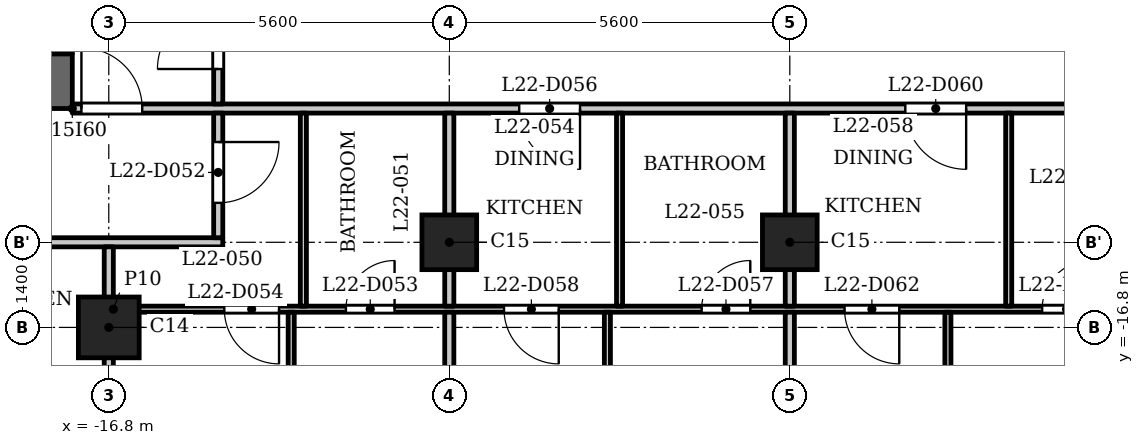
"""IFC4 building model, lengths in metres.
Left out: names, types, materials, properties, quantities, classifications, styles, units other than length and angle.
Written with IfcOpenShell. Run it as: python <this file> out.ifc"""

import sys

from ifc_helpers import new_model, si_unit, direction, frame, frame_2d, origin, origin_2d, place, context, subcontext, project, spatial, rectangle, extrude, element, fill, save


model = new_model("IFC4")
c1 = context("Model", 3, precision=1e-05, world=origin(), true_north=direction((0.0, 1.0)))
c2 = subcontext(c1, "Body", "Model", "MODEL_VIEW")
j1 = project(units=[si_unit("LENGTHUNIT", "METRE"), si_unit("PLANEANGLEUNIT", "RADIAN")], contexts=[c1])
p1 = place(None, origin())
s1 = spatial("IfcSite", under=j1, at=p1, CompositionType="ELEMENT")
p2 = place(p1, origin())
s2 = spatial("IfcBuilding", under=s1, at=p2, CompositionType="ELEMENT")
p3 = place(p2, frame((0.0, 0.0, 90.3)))
s3 = spatial("IfcBuildingStorey", under=s2, at=p3, CompositionType="ELEMENT", Elevation=90.3)
p4 = place(p3, frame((-16.8, -16.8, 0.0), z_axis=(0.0, 0.0, 1.0), x_axis=(1.0, 0.0, 0.0)))
e1 = element("IfcColumn", 1, at=p4, inside=s3, PredefinedType="COLUMN", context=c2, shape_type="SweptSolid", body=[
    extrude(rectangle(XDim=1.0, YDim=1.0, at=origin_2d()), origin(), (0.0, 0.0, 1.0), 3.5),
])
for number, where, z_axis, x_axis in (
    (2, (-11.2, -15.4, 0.0), (0.0, 0.0, 1.0), (1.0, 0.0, 0.0)),
    (3, (-5.6, -15.4, 0.0), (0.0, 0.0, 1.0), (1.0, 0.0, 0.0)),
):
    element("IfcColumn", number, at=place(p3, frame(where, z_axis=z_axis, x_axis=x_axis)), inside=s3, PredefinedType="COLUMN", context=c2, shape_type="SweptSolid", body=[
        extrude(rectangle(XDim=0.9, YDim=0.9, at=origin_2d()), origin(), (0.0, 0.0, 1.0), 3.5),
    ])
p5 = place(p3, frame((-17.4, -12.75, 0.0), z_axis=(0.0, 0.0, 1.0), x_axis=(-1.0, 0.0, 0.0)))
e4 = element("IfcWall", 4, at=p5, inside=s3, PredefinedType="SHEAR", context=c2, shape_type="SweptSolid", body=[
    extrude(rectangle(XDim=10.4, YDim=0.9, at=frame_2d((5.2, 0.0))), origin(), (0.0, 0.0, 1.0), 3.2),
])
p6 = place(p3, frame((-17.6, -12.3, 0.0), z_axis=(0.0, 0.0, 1.0), x_axis=(0.0, 1.0, 0.0)))
e5 = element("IfcWall", 5, at=p6, inside=s3, PredefinedType="SHEAR", context=c2, shape_type="SweptSolid", body=[
    extrude(rectangle(XDim=24.6, YDim=0.4, at=frame_2d((12.3, 0.0))), origin(), (0.0, 0.0, 1.0), 3.2),
])
p7 = place(p6, frame((6.0, 0.0, 0.0)))
e6 = element("IfcOpeningElement", 6, at=p7, cuts=e5, PredefinedType="OPENING", context=c2, shape_type="SweptSolid", body=[
    extrude(rectangle(XDim=1.1, YDim=2.1, at=frame_2d((0.55, 1.05))), frame((0.0, 0.21, 0.0), z_axis=(0.0, -1.0, 0.0), x_axis=(1.0, 0.0, 0.0)), (0.0, 0.0, 1.0), 0.42),
])
p8 = place(p6, frame((8.4, 0.0, 0.0)))
e7 = element("IfcOpeningElement", 7, at=p8, cuts=e5, PredefinedType="OPENING", context=c2, shape_type="SweptSolid", body=[
    extrude(rectangle(XDim=1.1, YDim=2.1, at=frame_2d((0.55, 1.05))), frame((0.0, 0.21, 0.0), z_axis=(0.0, -1.0, 0.0), x_axis=(1.0, 0.0, 0.0)), (0.0, 0.0, 1.0), 0.42),
])
p9 = place(p6, frame((10.8, 0.0, 0.0)))
e8 = element("IfcOpeningElement", 8, at=p9, cuts=e5, PredefinedType="OPENING", context=c2, shape_type="SweptSolid", body=[
    extrude(rectangle(XDim=1.1, YDim=2.1, at=frame_2d((0.55, 1.05))), frame((0.0, 0.21, 0.0), z_axis=(0.0, -1.0, 0.0), x_axis=(1.0, 0.0, 0.0)), (0.0, 0.0, 1.0), 0.42),
])
p10 = place(p6, frame((16.75, 0.0, 0.0)))
e9 = element("IfcOpeningElement", 9, at=p10, cuts=e5, PredefinedType="OPENING", context=c2, shape_type="SweptSolid", body=[
    extrude(rectangle(XDim=0.9, YDim=2.1, at=frame_2d((0.45, 1.05))), frame((0.0, 0.21, 0.0), z_axis=(0.0, -1.0, 0.0), x_axis=(1.0, 0.0, 0.0)), (0.0, 0.0, 1.0), 0.42),
])
p11 = place(p6, frame((22.8, 0.0, 0.0)))
e10 = element("IfcOpeningElement", 10, at=p11, cuts=e5, PredefinedType="OPENING", context=c2, shape_type="SweptSolid", body=[
    extrude(rectangle(XDim=1.1, YDim=2.1, at=frame_2d((0.55, 1.05))), frame((0.0, 0.21, 0.0), z_axis=(0.0, -1.0, 0.0), x_axis=(1.0, 0.0, 0.0)), (0.0, 0.0, 1.0), 0.42),
])
p12 = place(p6, frame((0.7, 0.0, 0.0)))
e11 = element("IfcOpeningElement", 11, at=p12, cuts=e5, PredefinedType="OPENING", context=c2, shape_type="SweptSolid", body=[
    extrude(rectangle(XDim=1.1, YDim=2.1, at=frame_2d((0.55, 1.05))), frame((0.0, 0.21, 0.0), z_axis=(0.0, -1.0, 0.0), x_axis=(1.0, 0.0, 0.0)), (0.0, 0.0, 1.0), 0.42),
])
p13 = place(p6, frame((12.775, 0.0, 0.0)))
e12 = element("IfcOpeningElement", 12, at=p13, cuts=e5, PredefinedType="OPENING", context=c2, shape_type="SweptSolid", body=[
    extrude(rectangle(XDim=1.8, YDim=2.1, at=frame_2d((0.9, 1.05))), frame((0.0, 0.21, 0.0), z_axis=(0.0, -1.0, 0.0), x_axis=(1.0, 0.0, 0.0)), (0.0, 0.0, 1.0), 0.42),
])
p14 = place(p3, frame((-16.725, -16.5, 0.0), z_axis=(0.0, 0.0, 1.0), x_axis=(1.0, 0.0, 0.0)))
e13 = element("IfcWall", 13, at=p14, inside=s3, PredefinedType="PARTITIONING", context=c2, shape_type="SweptSolid", body=[
    extrude(rectangle(XDim=33.45, YDim=0.1, at=frame_2d((16.725, 0.0))), origin(), (0.0, 0.0, 1.0), 3.2),
])
p15 = place(p14, frame((3.825, 0.0, 0.0)))
e14 = element("IfcOpeningElement", 14, at=p15, cuts=e13, PredefinedType="OPENING", context=c2, shape_type="SweptSolid", body=[
    extrude(rectangle(XDim=0.8, YDim=2.1, at=frame_2d((0.4, 1.05))), frame((0.0, 0.06, 0.0), z_axis=(0.0, -1.0, 0.0), x_axis=(1.0, 0.0, 0.0)), (0.0, 0.0, 1.0), 0.12),
])
p16 = place(p14, frame((1.825, 0.0, 0.0)))
e15 = element("IfcOpeningElement", 15, at=p16, cuts=e13, PredefinedType="OPENING", context=c2, shape_type="SweptSolid", body=[
    extrude(rectangle(XDim=0.9, YDim=2.1, at=frame_2d((0.45, 1.05))), frame((0.0, 0.06, 0.0), z_axis=(0.0, -1.0, 0.0), x_axis=(1.0, 0.0, 0.0)), (0.0, 0.0, 1.0), 0.12),
])
p17 = place(p14, frame((9.675, 0.0, 0.0)))
e16 = element("IfcOpeningElement", 16, at=p17, cuts=e13, PredefinedType="OPENING", context=c2, shape_type="SweptSolid", body=[
    extrude(rectangle(XDim=0.8, YDim=2.1, at=frame_2d((0.4, 1.05))), frame((0.0, 0.06, 0.0), z_axis=(0.0, -1.0, 0.0), x_axis=(1.0, 0.0, 0.0)), (0.0, 0.0, 1.0), 0.12),
])
p18 = place(p14, frame((6.425, 0.0, 0.0)))
e17 = element("IfcOpeningElement", 17, at=p18, cuts=e13, PredefinedType="OPENING", context=c2, shape_type="SweptSolid", body=[
    extrude(rectangle(XDim=0.9, YDim=2.1, at=frame_2d((0.45, 1.05))), frame((0.0, 0.06, 0.0), z_axis=(0.0, -1.0, 0.0), x_axis=(1.0, 0.0, 0.0)), (0.0, 0.0, 1.0), 0.12),
])
p19 = place(p14, frame((15.275, 0.0, 0.0)))
e18 = element("IfcOpeningElement", 18, at=p19, cuts=e13, PredefinedType="OPENING", context=c2, shape_type="SweptSolid", body=[
    extrude(rectangle(XDim=0.8, YDim=2.1, at=frame_2d((0.4, 1.05))), frame((0.0, 0.06, 0.0), z_axis=(0.0, -1.0, 0.0), x_axis=(1.0, 0.0, 0.0)), (0.0, 0.0, 1.0), 0.12),
])
p20 = place(p14, frame((12.025, 0.0, 0.0)))
e19 = element("IfcOpeningElement", 19, at=p20, cuts=e13, PredefinedType="OPENING", context=c2, shape_type="SweptSolid", body=[
    extrude(rectangle(XDim=0.9, YDim=2.1, at=frame_2d((0.45, 1.05))), frame((0.0, 0.06, 0.0), z_axis=(0.0, -1.0, 0.0), x_axis=(1.0, 0.0, 0.0)), (0.0, 0.0, 1.0), 0.12),
])
p21 = place(p14, frame((20.875, 0.0, 0.0)))
e20 = element("IfcOpeningElement", 20, at=p21, cuts=e13, PredefinedType="OPENING", context=c2, shape_type="SweptSolid", body=[
    extrude(rectangle(XDim=0.8, YDim=2.1, at=frame_2d((0.4, 1.05))), frame((0.0, 0.06, 0.0), z_axis=(0.0, -1.0, 0.0), x_axis=(1.0, 0.0, 0.0)), (0.0, 0.0, 1.0), 0.12),
])
p22 = place(p14, frame((18.625, 0.0, 0.0)))
e21 = element("IfcOpeningElement", 21, at=p22, cuts=e13, PredefinedType="OPENING", context=c2, shape_type="SweptSolid", body=[
    extrude(rectangle(XDim=0.9, YDim=2.1, at=frame_2d((0.45, 1.05))), frame((0.0, 0.06, 0.0), z_axis=(0.0, -1.0, 0.0), x_axis=(1.0, 0.0, 0.0)), (0.0, 0.0, 1.0), 0.12),
])
p23 = place(p14, frame((23.875, 0.0, 0.0)))
e22 = element("IfcOpeningElement", 22, at=p23, cuts=e13, PredefinedType="OPENING", context=c2, shape_type="SweptSolid", body=[
    extrude(rectangle(XDim=0.8, YDim=2.1, at=frame_2d((0.4, 1.05))), frame((0.0, 0.06, 0.0), z_axis=(0.0, -1.0, 0.0), x_axis=(1.0, 0.0, 0.0)), (0.0, 0.0, 1.0), 0.12),
])
p24 = place(p14, frame((26.225, 0.0, 0.0)))
e23 = element("IfcOpeningElement", 23, at=p24, cuts=e13, PredefinedType="OPENING", context=c2, shape_type="SweptSolid", body=[
    extrude(rectangle(XDim=0.9, YDim=2.1, at=frame_2d((0.45, 1.05))), frame((0.0, 0.06, 0.0), z_axis=(0.0, -1.0, 0.0), x_axis=(1.0, 0.0, 0.0)), (0.0, 0.0, 1.0), 0.12),
])
p25 = place(p14, frame((28.575, 0.0, 0.0)))
e24 = element("IfcOpeningElement", 24, at=p25, cuts=e13, PredefinedType="OPENING", context=c2, shape_type="SweptSolid", body=[
    extrude(rectangle(XDim=0.9, YDim=2.1, at=frame_2d((0.45, 1.05))), frame((0.0, 0.06, 0.0), z_axis=(0.0, -1.0, 0.0), x_axis=(1.0, 0.0, 0.0)), (0.0, 0.0, 1.0), 0.12),
])
p26 = place(p14, frame((30.675, 0.0, 0.0)))
e25 = element("IfcOpeningElement", 25, at=p26, cuts=e13, PredefinedType="OPENING", context=c2, shape_type="SweptSolid", body=[
    extrude(rectangle(XDim=0.9, YDim=2.1, at=frame_2d((0.45, 1.05))), frame((0.0, 0.06, 0.0), z_axis=(0.0, -1.0, 0.0), x_axis=(1.0, 0.0, 0.0)), (0.0, 0.0, 1.0), 0.12),
])
p27 = place(p3, frame((-27.484, -15.4, 0.0), z_axis=(0.0, 0.0, 1.0), x_axis=(1.0, 0.0, 0.0)))
e26 = element("IfcWall", 26, at=p27, inside=s3, PredefinedType="PARTITIONING", context=c2, shape_type="SweptSolid", body=[
    extrude(rectangle(XDim=12.559, YDim=0.15, at=frame_2d((6.279, 0.0))), origin(), (0.0, 0.0, 1.0), 3.2),
])
p28 = place(p27, frame((5.734, 0.0, 0.0)))
e27 = element("IfcOpeningElement", 27, at=p28, cuts=e26, PredefinedType="OPENING", context=c2, shape_type="SweptSolid", body=[
    extrude(rectangle(XDim=1.0, YDim=2.1, at=frame_2d((0.5, 1.05))), frame((0.0, 0.085, 0.0), z_axis=(0.0, -1.0, 0.0), x_axis=(1.0, 0.0, 0.0)), (0.0, 0.0, 1.0), 0.17),
])
p29 = place(p3, frame((-17.4, -13.2, 0.0), z_axis=(0.0, 0.0, 1.0), x_axis=(1.0, 0.0, 0.0)))
e28 = element("IfcWall", 28, at=p29, inside=s3, PredefinedType="PARTITIONING", context=c2, shape_type="SweptSolid", body=[
    extrude(rectangle(XDim=34.8, YDim=0.15, at=frame_2d((17.4, 0.0))), origin(), (0.0, 0.0, 1.0), 3.2),
])
p30 = place(p29, frame((0.15, 0.0, 0.0)))
e29 = element("IfcOpeningElement", 29, at=p30, cuts=e28, PredefinedType="OPENING", context=c2, shape_type="SweptSolid", body=[
    extrude(rectangle(XDim=1.0, YDim=2.1, at=frame_2d((0.5, 1.05))), frame((0.0, 0.085, 0.0), z_axis=(0.0, -1.0, 0.0), x_axis=(1.0, 0.0, 0.0)), (0.0, 0.0, 1.0), 0.17),
])
p31 = place(p29, frame((33.55, 0.0, 0.0)))
e30 = element("IfcOpeningElement", 30, at=p31, cuts=e28, PredefinedType="OPENING", context=c2, shape_type="SweptSolid", body=[
    extrude(rectangle(XDim=1.0, YDim=2.1, at=frame_2d((0.5, 1.05))), frame((0.0, 0.085, 0.0), z_axis=(0.0, -1.0, 0.0), x_axis=(1.0, 0.0, 0.0)), (0.0, 0.0, 1.0), 0.17),
])
p32 = place(p29, frame((7.35, 0.0, 0.0)))
e31 = element("IfcOpeningElement", 31, at=p32, cuts=e28, PredefinedType="OPENING", context=c2, shape_type="SweptSolid", body=[
    extrude(rectangle(XDim=1.0, YDim=2.1, at=frame_2d((0.5, 1.05))), frame((0.0, 0.085, 0.0), z_axis=(0.0, -1.0, 0.0), x_axis=(1.0, 0.0, 0.0)), (0.0, 0.0, 1.0), 0.17),
])
p33 = place(p29, frame((13.7, 0.0, 0.0)))
e32 = element("IfcOpeningElement", 32, at=p33, cuts=e28, PredefinedType="OPENING", context=c2, shape_type="SweptSolid", body=[
    extrude(rectangle(XDim=1.0, YDim=2.1, at=frame_2d((0.5, 1.05))), frame((0.0, 0.085, 0.0), z_axis=(0.0, -1.0, 0.0), x_axis=(1.0, 0.0, 0.0)), (0.0, 0.0, 1.0), 0.17),
])
p34 = place(p29, frame((19.3, 0.0, 0.0)))
e33 = element("IfcOpeningElement", 33, at=p34, cuts=e28, PredefinedType="OPENING", context=c2, shape_type="SweptSolid", body=[
    extrude(rectangle(XDim=1.0, YDim=2.1, at=frame_2d((0.5, 1.05))), frame((0.0, 0.085, 0.0), z_axis=(0.0, -1.0, 0.0), x_axis=(1.0, 0.0, 0.0)), (0.0, 0.0, 1.0), 0.17),
])
p35 = place(p3, frame((-16.8, -23.03, 0.0), z_axis=(0.0, 0.0, 1.0), x_axis=(0.0, 1.0, 0.0)))
e34 = element("IfcWall", 34, at=p35, inside=s3, PredefinedType="PARTITIONING", context=c2, shape_type="SweptSolid", body=[
    extrude(rectangle(XDim=7.555, YDim=0.15, at=frame_2d((3.777, 0.0))), origin(), (0.0, 0.0, 1.0), 3.2),
])
p36 = place(p3, frame((-15.0, -15.325, 0.0), z_axis=(0.0, 0.0, 1.0), x_axis=(0.0, 1.0, 0.0)))
e35 = element("IfcWall", 35, at=p36, inside=s3, PredefinedType="PARTITIONING", context=c2, shape_type="SweptSolid", body=[
    extrude(rectangle(XDim=2.05, YDim=0.15, at=frame_2d((1.025, 0.0))), origin(), (0.0, 0.0, 1.0), 3.2),
])
p37 = place(p36, frame((0.574, 0.0, 0.0)))
e36 = element("IfcOpeningElement", 36, at=p37, cuts=e35, PredefinedType="OPENING", context=c2, shape_type="SweptSolid", body=[
    extrude(rectangle(XDim=1.0, YDim=2.1, at=frame_2d((0.5, 1.05))), frame((0.0, 0.085, 0.0), z_axis=(0.0, -1.0, 0.0), x_axis=(1.0, 0.0, 0.0)), (0.0, 0.0, 1.0), 0.17),
])
p38 = place(p3, frame((-15.0, -13.125, 0.0), z_axis=(0.0, 0.0, 1.0), x_axis=(0.0, 1.0, 0.0)))
e37 = element("IfcWall", 37, at=p38, inside=s3, PredefinedType="PARTITIONING", context=c2, shape_type="SweptSolid", body=[
    extrude(rectangle(XDim=6.356, YDim=0.15, at=frame_2d((3.178, 0.0))), origin(), (0.0, 0.0, 1.0), 3.2),
])
p39 = place(p38, frame((0.575, 0.0, 0.0)))
e38 = element("IfcOpeningElement", 38, at=p39, cuts=e37, PredefinedType="OPENING", context=c2, shape_type="SweptSolid", body=[
    extrude(rectangle(XDim=1.0, YDim=2.1, at=frame_2d((0.5, 1.05))), frame((0.0, 0.085, 0.0), z_axis=(0.0, -1.0, 0.0), x_axis=(1.0, 0.0, 0.0)), (0.0, 0.0, 1.0), 0.17),
])
p40 = place(p3, frame((-13.8, -22.08, 0.0), z_axis=(0.0, 0.0, 1.0), x_axis=(0.0, 1.0, 0.0)))
e39 = element("IfcWall", 39, at=p40, inside=s3, PredefinedType="PARTITIONING", context=c2, shape_type="SweptSolid", body=[
    extrude(rectangle(XDim=5.53, YDim=0.1, at=frame_2d((2.765, 0.0))), origin(), (0.0, 0.0, 1.0), 3.2),
])
p41 = place(p40, frame((0.42, 0.0, 0.0)))
e40 = element("IfcOpeningElement", 40, at=p41, cuts=e39, PredefinedType="OPENING", context=c2, shape_type="SweptSolid", body=[
    extrude(rectangle(XDim=0.9, YDim=2.1, at=frame_2d((0.45, 1.05))), frame((0.0, 0.06, 0.0), z_axis=(0.0, -1.0, 0.0), x_axis=(1.0, 0.0, 0.0)), (0.0, 0.0, 1.0), 0.12),
])
p42 = place(p3, frame((-13.6, -16.45, 0.0), z_axis=(0.0, 0.0, 1.0), x_axis=(0.0, 1.0, 0.0)))
e41 = element("IfcWall", 41, at=p42, inside=s3, PredefinedType="PARTITIONING", context=c2, shape_type="SweptSolid", body=[
    extrude(rectangle(XDim=3.175, YDim=0.1, at=frame_2d((1.587, 0.0))), origin(), (0.0, 0.0, 1.0), 3.2),
])
p43 = place(p3, frame((-11.2, -23.03, 0.0), z_axis=(0.0, 0.0, 1.0), x_axis=(0.0, 1.0, 0.0)))
e42 = element("IfcWall", 42, at=p43, inside=s3, PredefinedType="PARTITIONING", context=c2, shape_type="SweptSolid", body=[
    extrude(rectangle(XDim=6.48, YDim=0.15, at=frame_2d((3.24, 0.0))), origin(), (0.0, 0.0, 1.0), 3.2),
])
p44 = place(p3, frame((-11.2, -16.45, 0.0), z_axis=(0.0, 0.0, 1.0), x_axis=(0.0, 1.0, 0.0)))
e43 = element("IfcWall", 43, at=p44, inside=s3, PredefinedType="PARTITIONING", context=c2, shape_type="SweptSolid", body=[
    extrude(rectangle(XDim=3.175, YDim=0.15, at=frame_2d((1.587, 0.0))), origin(), (0.0, 0.0, 1.0), 3.2),
])
p45 = place(p3, frame((-8.6, -22.08, 0.0), z_axis=(0.0, 0.0, 1.0), x_axis=(0.0, 1.0, 0.0)))
e44 = element("IfcWall", 44, at=p45, inside=s3, PredefinedType="PARTITIONING", context=c2, shape_type="SweptSolid", body=[
    extrude(rectangle(XDim=5.53, YDim=0.1, at=frame_2d((2.765, 0.0))), origin(), (0.0, 0.0, 1.0), 3.2),
])
p46 = place(p45, frame((0.42, 0.0, 0.0)))
e45 = element("IfcOpeningElement", 45, at=p46, cuts=e44, PredefinedType="OPENING", context=c2, shape_type="SweptSolid", body=[
    extrude(rectangle(XDim=0.9, YDim=2.1, at=frame_2d((0.45, 1.05))), frame((0.0, 0.06, 0.0), z_axis=(0.0, -1.0, 0.0), x_axis=(1.0, 0.0, 0.0)), (0.0, 0.0, 1.0), 0.12),
])
p47 = place(p3, frame((-8.4, -16.45, 0.0), z_axis=(0.0, 0.0, 1.0), x_axis=(0.0, 1.0, 0.0)))
e46 = element("IfcWall", 46, at=p47, inside=s3, PredefinedType="PARTITIONING", context=c2, shape_type="SweptSolid", body=[
    extrude(rectangle(XDim=3.175, YDim=0.1, at=frame_2d((1.587, 0.0))), origin(), (0.0, 0.0, 1.0), 3.2),
])
p48 = place(p3, frame((-5.6, -23.03, 0.0), z_axis=(0.0, 0.0, 1.0), x_axis=(0.0, 1.0, 0.0)))
e47 = element("IfcWall", 47, at=p48, inside=s3, PredefinedType="PARTITIONING", context=c2, shape_type="SweptSolid", body=[
    extrude(rectangle(XDim=6.48, YDim=0.15, at=frame_2d((3.24, 0.0))), origin(), (0.0, 0.0, 1.0), 3.2),
])
p49 = place(p3, frame((-5.6, -16.45, 0.0), z_axis=(0.0, 0.0, 1.0), x_axis=(0.0, 1.0, 0.0)))
e48 = element("IfcWall", 48, at=p49, inside=s3, PredefinedType="PARTITIONING", context=c2, shape_type="SweptSolid", body=[
    extrude(rectangle(XDim=3.175, YDim=0.15, at=frame_2d((1.587, 0.0))), origin(), (0.0, 0.0, 1.0), 3.2),
])
p50 = place(p3, frame((-3.0, -22.08, 0.0), z_axis=(0.0, 0.0, 1.0), x_axis=(0.0, 1.0, 0.0)))
e49 = element("IfcWall", 49, at=p50, inside=s3, PredefinedType="PARTITIONING", context=c2, shape_type="SweptSolid", body=[
    extrude(rectangle(XDim=5.53, YDim=0.1, at=frame_2d((2.765, 0.0))), origin(), (0.0, 0.0, 1.0), 3.2),
])
p51 = place(p50, frame((0.42, 0.0, 0.0)))
e50 = element("IfcOpeningElement", 50, at=p51, cuts=e49, PredefinedType="OPENING", context=c2, shape_type="SweptSolid", body=[
    extrude(rectangle(XDim=0.9, YDim=2.1, at=frame_2d((0.45, 1.05))), frame((0.0, 0.06, 0.0), z_axis=(0.0, -1.0, 0.0), x_axis=(1.0, 0.0, 0.0)), (0.0, 0.0, 1.0), 0.12),
])
p52 = place(p3, frame((-2.0, -16.45, 0.0), z_axis=(0.0, 0.0, 1.0), x_axis=(0.0, 1.0, 0.0)))
e51 = element("IfcWall", 51, at=p52, inside=s3, PredefinedType="PARTITIONING", context=c2, shape_type="SweptSolid", body=[
    extrude(rectangle(XDim=3.175, YDim=0.1, at=frame_2d((1.587, 0.0))), origin(), (0.0, 0.0, 1.0), 3.2),
])
p53 = place(p39, origin())
e52 = element("IfcDoor", 52, at=p53, inside=s3, OperationType="SINGLE_SWING_RIGHT", PredefinedType="DOOR", context=c2, shape_type="SweptSolid", body=[
    extrude(rectangle(XDim=1.0, YDim=2.1, at=frame_2d((0.5, 1.05))), frame((0.0, 0.025, 0.0), z_axis=(0.0, -1.0, 0.0), x_axis=(1.0, 0.0, 0.0)), (0.0, 0.0, 1.0), 0.05),
])
fill(e38, e52)
p54 = place(p30, origin())
e53 = element("IfcDoor", 53, at=p54, inside=s3, OperationType="SINGLE_SWING_RIGHT", PredefinedType="DOOR", context=c2, shape_type="SweptSolid", body=[
    extrude(rectangle(XDim=1.0, YDim=2.1, at=frame_2d((0.5, 1.05))), frame((0.0, 0.025, 0.0), z_axis=(0.0, -1.0, 0.0), x_axis=(1.0, 0.0, 0.0)), (0.0, 0.0, 1.0), 0.05),
])
fill(e29, e53)
p55 = place(p37, origin())
e54 = element("IfcDoor", 54, at=p55, inside=s3, OperationType="SINGLE_SWING_RIGHT", PredefinedType="DOOR", context=c2, shape_type="SweptSolid", body=[
    extrude(rectangle(XDim=1.0, YDim=2.1, at=frame_2d((0.5, 1.05))), frame((0.0, 0.025, 0.0), z_axis=(0.0, -1.0, 0.0), x_axis=(1.0, 0.0, 0.0)), (0.0, 0.0, 1.0), 0.05),
])
fill(e36, e54)
p56 = place(p15, origin())
e55 = element("IfcDoor", 55, at=p56, inside=s3, OperationType="SINGLE_SWING_LEFT", PredefinedType="DOOR", context=c2, shape_type="SweptSolid", body=[
    extrude(rectangle(XDim=0.8, YDim=2.1, at=frame_2d((0.4, 1.05))), frame((0.0, 0.025, 0.0), z_axis=(0.0, -1.0, 0.0), x_axis=(1.0, 0.0, 0.0)), (0.0, 0.0, 1.0), 0.05),
])
fill(e14, e55)
p57 = place(p16, origin())
e56 = element("IfcDoor", 56, at=p57, inside=s3, OperationType="SINGLE_SWING_RIGHT", PredefinedType="DOOR", context=c2, shape_type="SweptSolid", body=[
    extrude(rectangle(XDim=0.9, YDim=2.1, at=frame_2d((0.45, 1.05))), frame((0.0, 0.025, 0.0), z_axis=(0.0, -1.0, 0.0), x_axis=(1.0, 0.0, 0.0)), (0.0, 0.0, 1.0), 0.05),
])
fill(e15, e56)
p58 = place(p32, origin())
e57 = element("IfcDoor", 57, at=p58, inside=s3, OperationType="SINGLE_SWING_RIGHT", PredefinedType="DOOR", context=c2, shape_type="SweptSolid", body=[
    extrude(rectangle(XDim=1.0, YDim=2.1, at=frame_2d((0.5, 1.05))), frame((0.0, 0.025, 0.0), z_axis=(0.0, -1.0, 0.0), x_axis=(1.0, 0.0, 0.0)), (0.0, 0.0, 1.0), 0.05),
])
fill(e31, e57)
p59 = place(p17, origin())
e58 = element("IfcDoor", 58, at=p59, inside=s3, OperationType="SINGLE_SWING_LEFT", PredefinedType="DOOR", context=c2, shape_type="SweptSolid", body=[
    extrude(rectangle(XDim=0.8, YDim=2.1, at=frame_2d((0.4, 1.05))), frame((0.0, 0.025, 0.0), z_axis=(0.0, -1.0, 0.0), x_axis=(1.0, 0.0, 0.0)), (0.0, 0.0, 1.0), 0.05),
])
fill(e16, e58)
p60 = place(p18, origin())
e59 = element("IfcDoor", 59, at=p60, inside=s3, OperationType="SINGLE_SWING_RIGHT", PredefinedType="DOOR", context=c2, shape_type="SweptSolid", body=[
    extrude(rectangle(XDim=0.9, YDim=2.1, at=frame_2d((0.45, 1.05))), frame((0.0, 0.025, 0.0), z_axis=(0.0, -1.0, 0.0), x_axis=(1.0, 0.0, 0.0)), (0.0, 0.0, 1.0), 0.05),
])
fill(e17, e59)
p61 = place(p33, origin())
e60 = element("IfcDoor", 60, at=p61, inside=s3, OperationType="SINGLE_SWING_RIGHT", PredefinedType="DOOR", context=c2, shape_type="SweptSolid", body=[
    extrude(rectangle(XDim=1.0, YDim=2.1, at=frame_2d((0.5, 1.05))), frame((0.0, 0.025, 0.0), z_axis=(0.0, -1.0, 0.0), x_axis=(1.0, 0.0, 0.0)), (0.0, 0.0, 1.0), 0.05),
])
fill(e32, e60)
p62 = place(p19, origin())
e61 = element("IfcDoor", 61, at=p62, inside=s3, OperationType="SINGLE_SWING_LEFT", PredefinedType="DOOR", context=c2, shape_type="SweptSolid", body=[
    extrude(rectangle(XDim=0.8, YDim=2.1, at=frame_2d((0.4, 1.05))), frame((0.0, 0.025, 0.0), z_axis=(0.0, -1.0, 0.0), x_axis=(1.0, 0.0, 0.0)), (0.0, 0.0, 1.0), 0.05),
])
fill(e18, e61)
p63 = place(p20, origin())
e62 = element("IfcDoor", 62, at=p63, inside=s3, OperationType="SINGLE_SWING_RIGHT", PredefinedType="DOOR", context=c2, shape_type="SweptSolid", body=[
    extrude(rectangle(XDim=0.9, YDim=2.1, at=frame_2d((0.45, 1.05))), frame((0.0, 0.025, 0.0), z_axis=(0.0, -1.0, 0.0), x_axis=(1.0, 0.0, 0.0)), (0.0, 0.0, 1.0), 0.05),
])
fill(e19, e62)
save(model, sys.argv[1])
